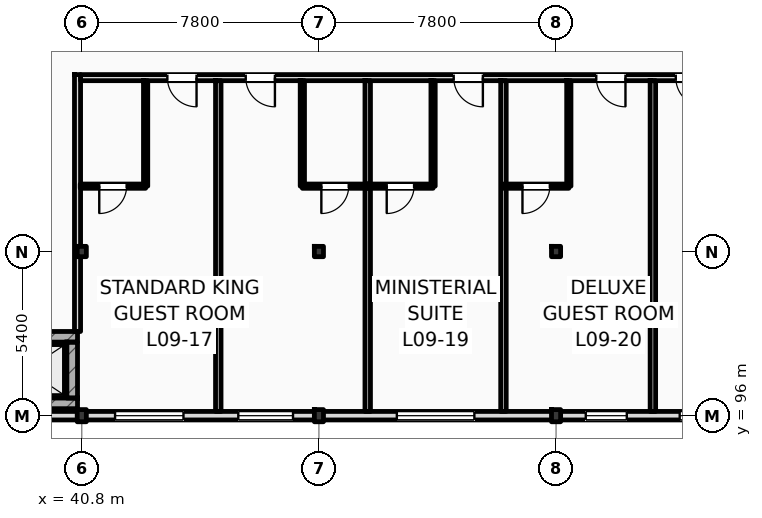
"""IFC4 building model, lengths in metres.
Left out: names, types, materials, properties, quantities, classifications, styles, units other than length and angle.
Written with IfcOpenShell. Run it as: python <this file> out.ifc"""

import sys

from ifc_helpers import new_model, si_unit, direction, frame, frame_2d, origin, origin_2d, place, context, subcontext, project, spatial, rectangle, i_section, extrude, element, fill, save


model = new_model("IFC4")
c1 = context("Model", 3, precision=1e-05, world=origin(), true_north=direction((0.0, 1.0)))
c2 = subcontext(c1, "Body", "Model", "MODEL_VIEW")
j1 = project(units=[si_unit("LENGTHUNIT", "METRE"), si_unit("PLANEANGLEUNIT", "RADIAN")], contexts=[c1])
p1 = place(None, origin())
s1 = spatial("IfcSite", under=j1, at=p1, CompositionType="ELEMENT")
p2 = place(p1, origin())
s2 = spatial("IfcBuilding", under=s1, at=p2, CompositionType="ELEMENT")
p3 = place(p2, frame((0.0, 0.0, 39.0)))
s3 = spatial("IfcBuildingStorey", under=s2, at=p3, CompositionType="ELEMENT", Elevation=39.0)
p4 = place(p3, frame((40.8, 96.0, 0.0), z_axis=(0.0, 0.0, 1.0), x_axis=(1.0, 0.0, 0.0)))
e1 = element("IfcColumn", 1, at=p4, inside=s3, PredefinedType="COLUMN", context=c2, shape_type="SweptSolid", body=[
    extrude(i_section(OverallWidth=0.3, OverallDepth=0.4, WebThickness=0.013, FlangeThickness=0.024, FilletRadius=0.027, at=origin_2d()), origin(), (0.0, 0.0, 1.0), 3.6),
])
p5 = place(p3, frame((40.8, 101.4, 0.0), z_axis=(0.0, 0.0, 1.0), x_axis=(1.0, 0.0, 0.0)))
e2 = element("IfcColumn", 2, at=p5, inside=s3, PredefinedType="COLUMN", context=c2, shape_type="SweptSolid", body=[
    extrude(i_section(OverallWidth=0.3, OverallDepth=0.34, WebThickness=0.012, FlangeThickness=0.021, FilletRadius=0.027, at=origin_2d()), origin(), (0.0, 0.0, 1.0), 3.6),
])
p6 = place(p3, frame((48.6, 96.0, 0.0), z_axis=(0.0, 0.0, 1.0), x_axis=(1.0, 0.0, 0.0)))
e3 = element("IfcColumn", 3, at=p6, inside=s3, PredefinedType="COLUMN", context=c2, shape_type="SweptSolid", body=[
    extrude(i_section(OverallWidth=0.3, OverallDepth=0.4, WebThickness=0.013, FlangeThickness=0.024, FilletRadius=0.027, at=origin_2d()), origin(), (0.0, 0.0, 1.0), 3.6),
])
p7 = place(p3, frame((48.6, 101.4, 0.0), z_axis=(0.0, 0.0, 1.0), x_axis=(1.0, 0.0, 0.0)))
e4 = element("IfcColumn", 4, at=p7, inside=s3, PredefinedType="COLUMN", context=c2, shape_type="SweptSolid", body=[
    extrude(i_section(OverallWidth=0.3, OverallDepth=0.34, WebThickness=0.012, FlangeThickness=0.021, FilletRadius=0.027, at=origin_2d()), origin(), (0.0, 0.0, 1.0), 3.6),
])
p8 = place(p3, frame((56.4, 96.0, 0.0), z_axis=(0.0, 0.0, 1.0), x_axis=(1.0, 0.0, 0.0)))
e5 = element("IfcColumn", 5, at=p8, inside=s3, PredefinedType="COLUMN", context=c2, shape_type="SweptSolid", body=[
    extrude(i_section(OverallWidth=0.3, OverallDepth=0.4, WebThickness=0.013, FlangeThickness=0.024, FilletRadius=0.027, at=origin_2d()), origin(), (0.0, 0.0, 1.0), 3.6),
])
p9 = place(p3, frame((56.4, 101.4, 0.0), z_axis=(0.0, 0.0, 1.0), x_axis=(1.0, 0.0, 0.0)))
e6 = element("IfcColumn", 6, at=p9, inside=s3, PredefinedType="COLUMN", context=c2, shape_type="SweptSolid", body=[
    extrude(i_section(OverallWidth=0.3, OverallDepth=0.34, WebThickness=0.012, FlangeThickness=0.021, FilletRadius=0.027, at=origin_2d()), origin(), (0.0, 0.0, 1.0), 3.6),
])
p10 = place(p3, frame((25.2, 96.0, 0.0), z_axis=(0.0, 0.0, 1.0), x_axis=(1.0, 0.0, 0.0)))
e7 = element("IfcWall", 7, at=p10, inside=s3, PredefinedType="STANDARD", context=c2, shape_type="SweptSolid", body=[
    extrude(rectangle(XDim=70.2, YDim=0.28, at=frame_2d((35.1, 0.0))), origin(), (0.0, 0.0, 1.0), 2.92),
])
p11 = place(p10, frame((16.695, 0.0, 0.9)))
e8 = element("IfcOpeningElement", 8, at=p11, cuts=e7, PredefinedType="OPENING", context=c2, shape_type="SweptSolid", body=[
    extrude(rectangle(XDim=2.25, YDim=1.84, at=frame_2d((1.125, 0.92))), frame((0.0, 0.15, 0.0), z_axis=(0.0, -1.0, 0.0), x_axis=(1.0, 0.0, 0.0)), (0.0, 0.0, 1.0), 0.3),
])
p12 = place(p10, frame((20.748, 0.0, 0.9)))
e9 = element("IfcOpeningElement", 9, at=p12, cuts=e7, PredefinedType="OPENING", context=c2, shape_type="SweptSolid", body=[
    extrude(rectangle(XDim=1.8, YDim=1.84, at=frame_2d((0.9, 0.92))), frame((0.0, 0.15, 0.0), z_axis=(0.0, -1.0, 0.0), x_axis=(1.0, 0.0, 0.0)), (0.0, 0.0, 1.0), 0.3),
])
p13 = place(p10, frame((25.963, 0.0, 0.9)))
e10 = element("IfcOpeningElement", 10, at=p13, cuts=e7, PredefinedType="OPENING", context=c2, shape_type="SweptSolid", body=[
    extrude(rectangle(XDim=2.55, YDim=1.84, at=frame_2d((1.275, 0.92))), frame((0.0, 0.15, 0.0), z_axis=(0.0, -1.0, 0.0), x_axis=(1.0, 0.0, 0.0)), (0.0, 0.0, 1.0), 0.3),
])
p14 = place(p10, frame((32.177, 0.0, 0.9)))
e11 = element("IfcOpeningElement", 11, at=p14, cuts=e7, PredefinedType="OPENING", context=c2, shape_type="SweptSolid", body=[
    extrude(rectangle(XDim=1.35, YDim=1.84, at=frame_2d((0.675, 0.92))), frame((0.0, 0.15, 0.0), z_axis=(0.0, -1.0, 0.0), x_axis=(1.0, 0.0, 0.0)), (0.0, 0.0, 1.0), 0.3),
])
p15 = place(p10, frame((35.267, 0.0, 0.9)))
e12 = element("IfcOpeningElement", 12, at=p15, cuts=e7, PredefinedType="OPENING", context=c2, shape_type="SweptSolid", body=[
    extrude(rectangle(XDim=2.85, YDim=1.84, at=frame_2d((1.425, 0.92))), frame((0.0, 0.15, 0.0), z_axis=(0.0, -1.0, 0.0), x_axis=(1.0, 0.0, 0.0)), (0.0, 0.0, 1.0), 0.3),
])
p16 = place(p10, frame((55.56, 0.0, 0.9)))
e13 = element("IfcOpeningElement", 13, at=p16, cuts=e7, PredefinedType="OPENING", context=c2, shape_type="SweptSolid", body=[
    extrude(rectangle(XDim=1.8, YDim=1.84, at=frame_2d((0.9, 0.92))), frame((0.0, 0.15, 0.0), z_axis=(0.0, -1.0, 0.0), x_axis=(1.0, 0.0, 0.0)), (0.0, 0.0, 1.0), 0.3),
])
p17 = place(p10, frame((59.093, 0.0, 0.9)))
e14 = element("IfcOpeningElement", 14, at=p17, cuts=e7, PredefinedType="OPENING", context=c2, shape_type="SweptSolid", body=[
    extrude(rectangle(XDim=2.412, YDim=1.84, at=frame_2d((1.206, 0.92))), frame((0.0, 0.15, 0.0), z_axis=(0.0, -1.0, 0.0), x_axis=(1.0, 0.0, 0.0)), (0.0, 0.0, 1.0), 0.3),
])
p18 = place(p10, frame((63.325, 0.0, 0.9)))
e15 = element("IfcOpeningElement", 15, at=p18, cuts=e7, PredefinedType="OPENING", context=c2, shape_type="SweptSolid", body=[
    extrude(rectangle(XDim=1.8, YDim=1.84, at=frame_2d((0.9, 0.92))), frame((0.0, 0.15, 0.0), z_axis=(0.0, -1.0, 0.0), x_axis=(1.0, 0.0, 0.0)), (0.0, 0.0, 1.0), 0.3),
])
p19 = place(p10, frame((66.718, 0.0, 0.9)))
e16 = element("IfcOpeningElement", 16, at=p19, cuts=e7, PredefinedType="OPENING", context=c2, shape_type="SweptSolid", body=[
    extrude(rectangle(XDim=2.472, YDim=1.84, at=frame_2d((1.236, 0.92))), frame((0.0, 0.15, 0.0), z_axis=(0.0, -1.0, 0.0), x_axis=(1.0, 0.0, 0.0)), (0.0, 0.0, 1.0), 0.3),
])
p20 = place(p3, frame((37.67, 98.595, 0.0), z_axis=(0.0, 0.0, 1.0), x_axis=(1.0, 0.0, 0.0)))
e17 = element("IfcWall", 17, at=p20, inside=s3, PredefinedType="SHEAR", context=c2, shape_type="SweptSolid", body=[
    extrude(rectangle(XDim=2.99, YDim=0.35, at=frame_2d((1.495, 0.0))), origin(), (0.0, 0.0, 1.0), 3.38),
])
p21 = place(p20, frame((0.695, 0.0, 0.0)))
e18 = element("IfcOpeningElement", 18, at=p21, cuts=e17, PredefinedType="OPENING", context=c2, shape_type="SweptSolid", body=[
    extrude(rectangle(XDim=1.25, YDim=2.25, at=frame_2d((0.625, 1.125))), frame((0.0, 0.185, 0.0), z_axis=(0.0, -1.0, 0.0), x_axis=(1.0, 0.0, 0.0)), (0.0, 0.0, 1.0), 0.37),
])
p22 = place(p3, frame((37.67, 96.405, 0.0), z_axis=(0.0, 0.0, 1.0), x_axis=(1.0, 0.0, 0.0)))
e19 = element("IfcWall", 19, at=p22, inside=s3, PredefinedType="SHEAR", context=c2, shape_type="SweptSolid", body=[
    extrude(rectangle(XDim=2.99, YDim=0.35, at=frame_2d((1.495, 0.0))), origin(), (0.0, 0.0, 1.0), 3.38),
])
p23 = place(p3, frame((40.485, 96.58, 0.0), z_axis=(0.0, 0.0, 1.0), x_axis=(0.0, 1.0, 0.0)))
e20 = element("IfcWall", 20, at=p23, inside=s3, PredefinedType="SHEAR", context=c2, shape_type="SweptSolid", body=[
    extrude(rectangle(XDim=1.84, YDim=0.35, at=frame_2d((0.92, 0.0))), origin(), (0.0, 0.0, 1.0), 3.01),
])
p24 = place(p3, frame((40.76, 107.12, 0.0), z_axis=(0.0, 0.0, 1.0), x_axis=(1.0, 0.0, 0.0)))
e21 = element("IfcWall", 21, at=p24, inside=s3, PredefinedType="PARTITIONING", context=c2, shape_type="SweptSolid", body=[
    extrude(rectangle(XDim=23.44, YDim=0.2, at=frame_2d((11.72, 0.0))), origin(), (0.0, 0.0, 1.0), 3.38),
])
p25 = place(p24, frame((2.855, 0.0, 0.0)))
e22 = element("IfcOpeningElement", 22, at=p25, cuts=e21, PredefinedType="OPENING", context=c2, shape_type="SweptSolid", body=[
    extrude(rectangle(XDim=0.96, YDim=2.2, at=frame_2d((0.48, 1.1))), frame((0.0, 0.11, 0.0), z_axis=(0.0, -1.0, 0.0), x_axis=(1.0, 0.0, 0.0)), (0.0, 0.0, 1.0), 0.22),
])
p26 = place(p24, frame((5.433, 0.0, 0.0)))
e23 = element("IfcOpeningElement", 23, at=p26, cuts=e21, PredefinedType="OPENING", context=c2, shape_type="SweptSolid", body=[
    extrude(rectangle(XDim=0.96, YDim=2.2, at=frame_2d((0.48, 1.1))), frame((0.0, 0.11, 0.0), z_axis=(0.0, -1.0, 0.0), x_axis=(1.0, 0.0, 0.0)), (0.0, 0.0, 1.0), 0.22),
])
p27 = place(p24, frame((12.273, 0.0, 0.0)))
e24 = element("IfcOpeningElement", 24, at=p27, cuts=e21, PredefinedType="OPENING", context=c2, shape_type="SweptSolid", body=[
    extrude(rectangle(XDim=0.96, YDim=2.2, at=frame_2d((0.48, 1.1))), frame((0.0, 0.11, 0.0), z_axis=(0.0, -1.0, 0.0), x_axis=(1.0, 0.0, 0.0)), (0.0, 0.0, 1.0), 0.22),
])
p28 = place(p24, frame((16.963, 0.0, 0.0)))
e25 = element("IfcOpeningElement", 25, at=p28, cuts=e21, PredefinedType="OPENING", context=c2, shape_type="SweptSolid", body=[
    extrude(rectangle(XDim=0.96, YDim=2.2, at=frame_2d((0.48, 1.1))), frame((0.0, 0.11, 0.0), z_axis=(0.0, -1.0, 0.0), x_axis=(1.0, 0.0, 0.0)), (0.0, 0.0, 1.0), 0.22),
])
p29 = place(p24, frame((19.578, 0.0, 0.0)))
e26 = element("IfcOpeningElement", 26, at=p29, cuts=e21, PredefinedType="OPENING", context=c2, shape_type="SweptSolid", body=[
    extrude(rectangle(XDim=0.96, YDim=2.2, at=frame_2d((0.48, 1.1))), frame((0.0, 0.11, 0.0), z_axis=(0.0, -1.0, 0.0), x_axis=(1.0, 0.0, 0.0)), (0.0, 0.0, 1.0), 0.22),
])
p30 = place(p3, frame((40.66, 98.77, 0.0), z_axis=(0.0, 0.0, 1.0), x_axis=(0.0, 1.0, 0.0)))
e27 = element("IfcWall", 27, at=p30, inside=s3, PredefinedType="PARTITIONING", context=c2, shape_type="SweptSolid", body=[
    extrude(rectangle(XDim=8.45, YDim=0.2, at=frame_2d((4.225, 0.0))), origin(), (0.0, 0.0, 1.0), 3.01),
])
p31 = place(p3, frame((45.29, 96.14, 0.0), z_axis=(0.0, 0.0, 1.0), x_axis=(0.0, 1.0, 0.0)))
e28 = element("IfcWall", 28, at=p31, inside=s3, PredefinedType="PARTITIONING", context=c2, shape_type="SweptSolid", body=[
    extrude(rectangle(XDim=10.88, YDim=0.18, at=frame_2d((5.44, 0.0))), origin(), (0.0, 0.0, 1.0), 3.38),
])
p32 = place(p3, frame((42.9, 103.55, 0.0), z_axis=(0.0, 0.0, 1.0), x_axis=(0.0, 1.0, 0.0)))
e29 = element("IfcWall", 29, at=p32, inside=s3, PredefinedType="PARTITIONING", context=c2, shape_type="SweptSolid", body=[
    extrude(rectangle(XDim=3.47, YDim=0.14, at=frame_2d((1.735, 0.0))), origin(), (0.0, 0.0, 1.0), 3.38),
])
p33 = place(p3, frame((40.75, 103.55, 0.0), z_axis=(0.0, 0.0, 1.0), x_axis=(1.0, 0.0, 0.0)))
e30 = element("IfcWall", 30, at=p33, inside=s3, PredefinedType="PARTITIONING", context=c2, shape_type="SweptSolid", body=[
    extrude(rectangle(XDim=2.15, YDim=0.14, at=frame_2d((1.075, 0.0))), origin(), (0.0, 0.0, 1.0), 3.38),
])
p34 = place(p33, frame((0.625, 0.0, 0.0)))
e31 = element("IfcOpeningElement", 31, at=p34, cuts=e30, PredefinedType="OPENING", context=c2, shape_type="SweptSolid", body=[
    extrude(rectangle(XDim=0.9, YDim=2.1, at=frame_2d((0.45, 1.05))), frame((0.0, 0.08, 0.0), z_axis=(0.0, -1.0, 0.0), x_axis=(1.0, 0.0, 0.0)), (0.0, 0.0, 1.0), 0.16),
])
p35 = place(p3, frame((50.205, 96.14, 0.0), z_axis=(0.0, 0.0, 1.0), x_axis=(0.0, 1.0, 0.0)))
e32 = element("IfcWall", 32, at=p35, inside=s3, PredefinedType="PARTITIONING", context=c2, shape_type="SweptSolid", body=[
    extrude(rectangle(XDim=10.88, YDim=0.18, at=frame_2d((5.44, 0.0))), origin(), (0.0, 0.0, 1.0), 3.38),
])
p36 = place(p3, frame((48.055, 103.55, 0.0), z_axis=(0.0, 0.0, 1.0), x_axis=(0.0, 1.0, 0.0)))
e33 = element("IfcWall", 33, at=p36, inside=s3, PredefinedType="PARTITIONING", context=c2, shape_type="SweptSolid", body=[
    extrude(rectangle(XDim=3.47, YDim=0.14, at=frame_2d((1.735, 0.0))), origin(), (0.0, 0.0, 1.0), 3.38),
])
p37 = place(p3, frame((48.055, 103.55, 0.0), z_axis=(0.0, 0.0, 1.0), x_axis=(1.0, 0.0, 0.0)))
e34 = element("IfcWall", 34, at=p37, inside=s3, PredefinedType="PARTITIONING", context=c2, shape_type="SweptSolid", body=[
    extrude(rectangle(XDim=2.15, YDim=0.14, at=frame_2d((1.075, 0.0))), origin(), (0.0, 0.0, 1.0), 3.38),
])
p38 = place(p37, frame((0.625, 0.0, 0.0)))
e35 = element("IfcOpeningElement", 35, at=p38, cuts=e34, PredefinedType="OPENING", context=c2, shape_type="SweptSolid", body=[
    extrude(rectangle(XDim=0.9, YDim=2.1, at=frame_2d((0.45, 1.05))), frame((0.0, 0.08, 0.0), z_axis=(0.0, -1.0, 0.0), x_axis=(1.0, 0.0, 0.0)), (0.0, 0.0, 1.0), 0.16),
])
p39 = place(p3, frame((54.67, 96.14, 0.0), z_axis=(0.0, 0.0, 1.0), x_axis=(0.0, 1.0, 0.0)))
e36 = element("IfcWall", 36, at=p39, inside=s3, PredefinedType="PARTITIONING", context=c2, shape_type="SweptSolid", body=[
    extrude(rectangle(XDim=10.88, YDim=0.18, at=frame_2d((5.44, 0.0))), origin(), (0.0, 0.0, 1.0), 3.38),
])
p40 = place(p3, frame((52.355, 103.55, 0.0), z_axis=(0.0, 0.0, 1.0), x_axis=(0.0, 1.0, 0.0)))
e37 = element("IfcWall", 37, at=p40, inside=s3, PredefinedType="PARTITIONING", context=c2, shape_type="SweptSolid", body=[
    extrude(rectangle(XDim=3.47, YDim=0.14, at=frame_2d((1.735, 0.0))), origin(), (0.0, 0.0, 1.0), 3.38),
])
p41 = place(p3, frame((50.205, 103.55, 0.0), z_axis=(0.0, 0.0, 1.0), x_axis=(1.0, 0.0, 0.0)))
e38 = element("IfcWall", 38, at=p41, inside=s3, PredefinedType="PARTITIONING", context=c2, shape_type="SweptSolid", body=[
    extrude(rectangle(XDim=2.15, YDim=0.14, at=frame_2d((1.075, 0.0))), origin(), (0.0, 0.0, 1.0), 3.38),
])
p42 = place(p41, frame((0.625, 0.0, 0.0)))
e39 = element("IfcOpeningElement", 39, at=p42, cuts=e38, PredefinedType="OPENING", context=c2, shape_type="SweptSolid", body=[
    extrude(rectangle(XDim=0.9, YDim=2.1, at=frame_2d((0.45, 1.05))), frame((0.0, 0.08, 0.0), z_axis=(0.0, -1.0, 0.0), x_axis=(1.0, 0.0, 0.0)), (0.0, 0.0, 1.0), 0.16),
])
p43 = place(p3, frame((59.585, 96.14, 0.0), z_axis=(0.0, 0.0, 1.0), x_axis=(0.0, 1.0, 0.0)))
e40 = element("IfcWall", 40, at=p43, inside=s3, PredefinedType="PARTITIONING", context=c2, shape_type="SweptSolid", body=[
    extrude(rectangle(XDim=10.88, YDim=0.18, at=frame_2d((5.44, 0.0))), origin(), (0.0, 0.0, 1.0), 3.38),
])
p44 = place(p3, frame((56.82, 103.55, 0.0), z_axis=(0.0, 0.0, 1.0), x_axis=(0.0, 1.0, 0.0)))
e41 = element("IfcWall", 41, at=p44, inside=s3, PredefinedType="PARTITIONING", context=c2, shape_type="SweptSolid", body=[
    extrude(rectangle(XDim=3.47, YDim=0.14, at=frame_2d((1.735, 0.0))), origin(), (0.0, 0.0, 1.0), 3.38),
])
p45 = place(p3, frame((54.67, 103.55, 0.0), z_axis=(0.0, 0.0, 1.0), x_axis=(1.0, 0.0, 0.0)))
e42 = element("IfcWall", 42, at=p45, inside=s3, PredefinedType="PARTITIONING", context=c2, shape_type="SweptSolid", body=[
    extrude(rectangle(XDim=2.15, YDim=0.14, at=frame_2d((1.075, 0.0))), origin(), (0.0, 0.0, 1.0), 3.38),
])
p46 = place(p45, frame((0.625, 0.0, 0.0)))
e43 = element("IfcOpeningElement", 43, at=p46, cuts=e42, PredefinedType="OPENING", context=c2, shape_type="SweptSolid", body=[
    extrude(rectangle(XDim=0.9, YDim=2.1, at=frame_2d((0.45, 1.05))), frame((0.0, 0.08, 0.0), z_axis=(0.0, -1.0, 0.0), x_axis=(1.0, 0.0, 0.0)), (0.0, 0.0, 1.0), 0.16),
])
p47 = place(p11, origin())
e44 = element("IfcWindow", 44, at=p47, inside=s3, PartitioningType="DOUBLE_PANEL_VERTICAL", PredefinedType="WINDOW", context=c2, shape_type="SweptSolid", body=[
    extrude(rectangle(XDim=2.25, YDim=1.84, at=frame_2d((1.125, 0.92))), frame((0.0, 0.03, 0.0), z_axis=(0.0, -1.0, 0.0), x_axis=(1.0, 0.0, 0.0)), (0.0, 0.0, 1.0), 0.06),
])
fill(e8, e44)
p48 = place(p12, origin())
e45 = element("IfcWindow", 45, at=p48, inside=s3, PartitioningType="DOUBLE_PANEL_VERTICAL", PredefinedType="WINDOW", context=c2, shape_type="SweptSolid", body=[
    extrude(rectangle(XDim=1.8, YDim=1.84, at=frame_2d((0.9, 0.92))), frame((0.0, 0.03, 0.0), z_axis=(0.0, -1.0, 0.0), x_axis=(1.0, 0.0, 0.0)), (0.0, 0.0, 1.0), 0.06),
])
fill(e9, e45)
p49 = place(p13, origin())
e46 = element("IfcWindow", 46, at=p49, inside=s3, PartitioningType="DOUBLE_PANEL_VERTICAL", PredefinedType="WINDOW", context=c2, shape_type="SweptSolid", body=[
    extrude(rectangle(XDim=2.55, YDim=1.84, at=frame_2d((1.275, 0.92))), frame((0.0, 0.03, 0.0), z_axis=(0.0, -1.0, 0.0), x_axis=(1.0, 0.0, 0.0)), (0.0, 0.0, 1.0), 0.06),
])
fill(e10, e46)
p50 = place(p14, origin())
e47 = element("IfcWindow", 47, at=p50, inside=s3, PartitioningType="DOUBLE_PANEL_VERTICAL", PredefinedType="WINDOW", context=c2, shape_type="SweptSolid", body=[
    extrude(rectangle(XDim=1.35, YDim=1.84, at=frame_2d((0.675, 0.92))), frame((0.0, 0.03, 0.0), z_axis=(0.0, -1.0, 0.0), x_axis=(1.0, 0.0, 0.0)), (0.0, 0.0, 1.0), 0.06),
])
fill(e11, e47)
p51 = place(p15, origin())
e48 = element("IfcWindow", 48, at=p51, inside=s3, PartitioningType="DOUBLE_PANEL_VERTICAL", PredefinedType="WINDOW", context=c2, shape_type="SweptSolid", body=[
    extrude(rectangle(XDim=2.85, YDim=1.84, at=frame_2d((1.425, 0.92))), frame((0.0, 0.03, 0.0), z_axis=(0.0, -1.0, 0.0), x_axis=(1.0, 0.0, 0.0)), (0.0, 0.0, 1.0), 0.06),
])
fill(e12, e48)
p52 = place(p25, frame((0.96, 0.0, 0.0), z_axis=(0.0, 0.0, 1.0), x_axis=(-1.0, 0.0, 0.0)))
e49 = element("IfcDoor", 49, at=p52, inside=s3, OperationType="SINGLE_SWING_RIGHT", PredefinedType="DOOR", context=c2, shape_type="SweptSolid", body=[
    extrude(rectangle(XDim=0.96, YDim=2.2, at=frame_2d((0.48, 1.1))), frame((0.0, 0.025, 0.0), z_axis=(0.0, -1.0, 0.0), x_axis=(1.0, 0.0, 0.0)), (0.0, 0.0, 1.0), 0.05),
])
fill(e22, e49)
p53 = place(p34, frame((0.9, 0.0, 0.0), z_axis=(0.0, 0.0, 1.0), x_axis=(-1.0, 0.0, 0.0)))
e50 = element("IfcDoor", 50, at=p53, inside=s3, OperationType="SINGLE_SWING_LEFT", PredefinedType="DOOR", context=c2, shape_type="SweptSolid", body=[
    extrude(rectangle(XDim=0.9, YDim=2.1, at=frame_2d((0.45, 1.05))), frame((0.0, 0.025, 0.0), z_axis=(0.0, -1.0, 0.0), x_axis=(1.0, 0.0, 0.0)), (0.0, 0.0, 1.0), 0.05),
])
fill(e31, e50)
p54 = place(p26, frame((0.96, 0.0, 0.0), z_axis=(0.0, 0.0, 1.0), x_axis=(-1.0, 0.0, 0.0)))
e51 = element("IfcDoor", 51, at=p54, inside=s3, OperationType="SINGLE_SWING_RIGHT", PredefinedType="DOOR", context=c2, shape_type="SweptSolid", body=[
    extrude(rectangle(XDim=0.96, YDim=2.2, at=frame_2d((0.48, 1.1))), frame((0.0, 0.025, 0.0), z_axis=(0.0, -1.0, 0.0), x_axis=(1.0, 0.0, 0.0)), (0.0, 0.0, 1.0), 0.05),
])
fill(e23, e51)
p55 = place(p38, frame((0.9, 0.0, 0.0), z_axis=(0.0, 0.0, 1.0), x_axis=(-1.0, 0.0, 0.0)))
e52 = element("IfcDoor", 52, at=p55, inside=s3, OperationType="SINGLE_SWING_LEFT", PredefinedType="DOOR", context=c2, shape_type="SweptSolid", body=[
    extrude(rectangle(XDim=0.9, YDim=2.1, at=frame_2d((0.45, 1.05))), frame((0.0, 0.025, 0.0), z_axis=(0.0, -1.0, 0.0), x_axis=(1.0, 0.0, 0.0)), (0.0, 0.0, 1.0), 0.05),
])
fill(e35, e52)
p56 = place(p27, frame((0.96, 0.0, 0.0), z_axis=(0.0, 0.0, 1.0), x_axis=(-1.0, 0.0, 0.0)))
e53 = element("IfcDoor", 53, at=p56, inside=s3, OperationType="SINGLE_SWING_RIGHT", PredefinedType="DOOR", context=c2, shape_type="SweptSolid", body=[
    extrude(rectangle(XDim=0.96, YDim=2.2, at=frame_2d((0.48, 1.1))), frame((0.0, 0.025, 0.0), z_axis=(0.0, -1.0, 0.0), x_axis=(1.0, 0.0, 0.0)), (0.0, 0.0, 1.0), 0.05),
])
fill(e24, e53)
p57 = place(p42, frame((0.9, 0.0, 0.0), z_axis=(0.0, 0.0, 1.0), x_axis=(-1.0, 0.0, 0.0)))
e54 = element("IfcDoor", 54, at=p57, inside=s3, OperationType="SINGLE_SWING_LEFT", PredefinedType="DOOR", context=c2, shape_type="SweptSolid", body=[
    extrude(rectangle(XDim=0.9, YDim=2.1, at=frame_2d((0.45, 1.05))), frame((0.0, 0.025, 0.0), z_axis=(0.0, -1.0, 0.0), x_axis=(1.0, 0.0, 0.0)), (0.0, 0.0, 1.0), 0.05),
])
fill(e39, e54)
p58 = place(p28, frame((0.96, 0.0, 0.0), z_axis=(0.0, 0.0, 1.0), x_axis=(-1.0, 0.0, 0.0)))
e55 = element("IfcDoor", 55, at=p58, inside=s3, OperationType="SINGLE_SWING_RIGHT", PredefinedType="DOOR", context=c2, shape_type="SweptSolid", body=[
    extrude(rectangle(XDim=0.96, YDim=2.2, at=frame_2d((0.48, 1.1))), frame((0.0, 0.025, 0.0), z_axis=(0.0, -1.0, 0.0), x_axis=(1.0, 0.0, 0.0)), (0.0, 0.0, 1.0), 0.05),
])
fill(e25, e55)
p59 = place(p46, frame((0.9, 0.0, 0.0), z_axis=(0.0, 0.0, 1.0), x_axis=(-1.0, 0.0, 0.0)))
e56 = element("IfcDoor", 56, at=p59, inside=s3, OperationType="SINGLE_SWING_LEFT", PredefinedType="DOOR", context=c2, shape_type="SweptSolid", body=[
    extrude(rectangle(XDim=0.9, YDim=2.1, at=frame_2d((0.45, 1.05))), frame((0.0, 0.025, 0.0), z_axis=(0.0, -1.0, 0.0), x_axis=(1.0, 0.0, 0.0)), (0.0, 0.0, 1.0), 0.05),
])
fill(e43, e56)
p60 = place(p29, frame((0.96, 0.0, 0.0), z_axis=(0.0, 0.0, 1.0), x_axis=(-1.0, 0.0, 0.0)))
e57 = element("IfcDoor", 57, at=p60, inside=s3, OperationType="SINGLE_SWING_RIGHT", PredefinedType="DOOR", context=c2, shape_type="SweptSolid", body=[
    extrude(rectangle(XDim=0.96, YDim=2.2, at=frame_2d((0.48, 1.1))), frame((0.0, 0.025, 0.0), z_axis=(0.0, -1.0, 0.0), x_axis=(1.0, 0.0, 0.0)), (0.0, 0.0, 1.0), 0.05),
])
fill(e26, e57)
save(model, sys.argv[1])
